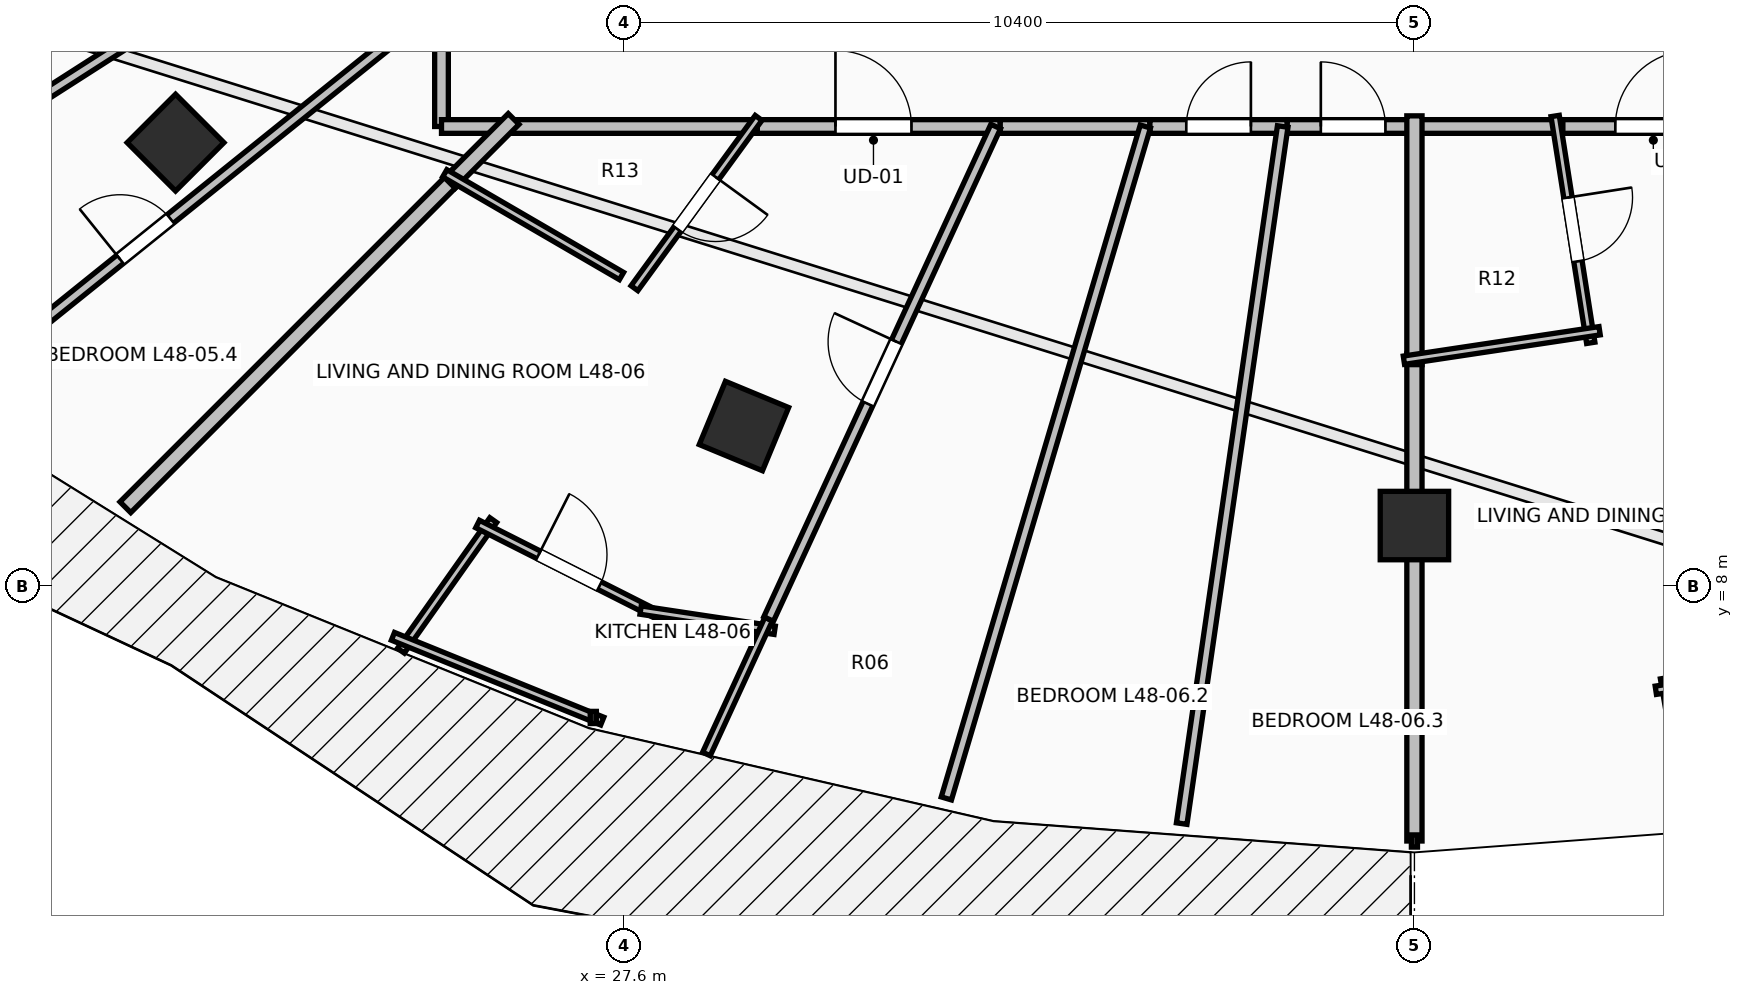
"""IFC4 building model, lengths in metres.
Left out: names, types, materials, properties, quantities, classifications, styles, units other than length and angle.
Written with IfcOpenShell. Run it as: python <this file> out.ifc"""

import sys

from ifc_helpers import new_model, si_unit, direction, frame, frame_2d, origin, origin_2d, place, context, subcontext, project, spatial, rectangle, extrude, element, fill, save


model = new_model("IFC4")
c1 = context("Model", 3, precision=1e-05, world=origin(), true_north=direction((0.0, 1.0)))
c2 = subcontext(c1, "Body", "Model", "MODEL_VIEW")
j1 = project(units=[si_unit("LENGTHUNIT", "METRE"), si_unit("PLANEANGLEUNIT", "RADIAN")], contexts=[c1])
p1 = place(None, origin())
s1 = spatial("IfcSite", under=j1, at=p1, CompositionType="ELEMENT")
p2 = place(p1, origin())
s2 = spatial("IfcBuilding", under=s1, at=p2, CompositionType="ELEMENT")
p3 = place(p2, frame((0.0, 0.0, 179.1)))
s3 = spatial("IfcBuildingStorey", under=s2, at=p3, CompositionType="ELEMENT", Elevation=179.1)
for number, where, z_axis, x_axis in (
    (1, (21.701, 13.838, 0.0), (0.0, 0.0, 1.0), (-0.707, -0.707, 0.0)),
    (2, (29.179, 10.109, 0.0), (0.0, 0.0, 1.0), (-0.383, -0.924, 0.0)),
    (3, (38.0, 8.8, 0.0), (0.0, 0.0, 1.0), (0.0, -1.0, 0.0)),
):
    element("IfcColumn", number, at=place(p3, frame(where, z_axis=z_axis, x_axis=x_axis)), inside=s3, PredefinedType="COLUMN", context=c2, shape_type="SweptSolid", body=[
        extrude(rectangle(XDim=0.9, YDim=0.9, at=origin_2d()), origin(), (0.0, 0.0, 1.0), 3.5),
    ])
p4 = place(p3, frame((25.2, 15.627, 0.0), z_axis=(0.0, 0.0, 1.0), x_axis=(0.0, -1.0, 0.0)))
e4 = element("IfcWall", 4, at=p4, inside=s3, PredefinedType="PARTITIONING", context=c2, shape_type="SweptSolid", body=[
    extrude(rectangle(XDim=1.577, YDim=0.18, at=frame_2d((0.789, 0.0))), origin(), (0.0, 0.0, 1.0), 2.432),
])
p5 = place(p3, frame((25.2, 14.05, 0.0), z_axis=(0.0, 0.0, 1.0), x_axis=(1.0, 0.0, 0.0)))
e5 = element("IfcWall", 5, at=p5, inside=s3, PredefinedType="PARTITIONING", context=c2, shape_type="SweptSolid", body=[
    extrude(rectangle(XDim=0.91, YDim=0.18, at=frame_2d((0.455, 0.0))), origin(), (0.0, 0.0, 1.0), 2.874),
])
p6 = place(p3, frame((29.215, 14.05, 0.0), z_axis=(0.0, 0.0, 1.0), x_axis=(1.0, 0.0, 0.0)))
e6 = element("IfcWall", 6, at=p6, inside=s3, PredefinedType="PARTITIONING", context=c2, shape_type="SweptSolid", body=[
    extrude(rectangle(XDim=3.336, YDim=0.18, at=frame_2d((1.668, 0.0))), origin(), (0.0, 0.0, 1.0), 3.24),
])
p7 = place(p6, frame((1.168, 0.0, 0.0)))
e7 = element("IfcOpeningElement", 7, at=p7, cuts=e6, PredefinedType="OPENING", context=c2, shape_type="SweptSolid", body=[
    extrude(rectangle(XDim=1.0, YDim=2.15, at=frame_2d((0.5, 1.075))), frame((0.0, 0.105, 0.0), z_axis=(0.0, -1.0, 0.0), x_axis=(1.0, 0.0, 0.0)), (0.0, 0.0, 1.0), 0.21),
])
p8 = place(p3, frame((25.97, 14.05, 0.0), z_axis=(0.0, 0.0, 1.0), x_axis=(1.0, 0.0, 0.0)))
e8 = element("IfcWall", 8, at=p8, inside=s3, PredefinedType="PARTITIONING", context=c2, shape_type="SweptSolid", body=[
    extrude(rectangle(XDim=3.385, YDim=0.18, at=frame_2d((1.692, 0.0))), origin(), (0.0, 0.0, 1.0), 2.432),
])
p9 = place(p3, frame((32.551, 14.05, 0.0), z_axis=(0.0, 0.0, 1.0), x_axis=(1.0, 0.0, 0.0)))
e9 = element("IfcWall", 9, at=p9, inside=s3, PredefinedType="PARTITIONING", context=c2, shape_type="SweptSolid", body=[
    extrude(rectangle(XDim=1.969, YDim=0.18, at=frame_2d((0.984, 0.0))), origin(), (0.0, 0.0, 1.0), 3.24),
])
p10 = place(p3, frame((34.52, 14.05, 0.0), z_axis=(0.0, 0.0, 1.0), x_axis=(1.0, 0.0, 0.0)))
e10 = element("IfcWall", 10, at=p10, inside=s3, PredefinedType="PARTITIONING", context=c2, shape_type="SweptSolid", body=[
    extrude(rectangle(XDim=1.807, YDim=0.18, at=frame_2d((0.903, 0.0))), origin(), (0.0, 0.0, 1.0), 3.24),
])
p11 = place(p10, frame((0.479, 0.0, 0.0)))
e11 = element("IfcOpeningElement", 11, at=p11, cuts=e10, PredefinedType="OPENING", context=c2, shape_type="SweptSolid", body=[
    extrude(rectangle(XDim=0.85, YDim=2.1, at=frame_2d((0.425, 1.05))), frame((0.0, 0.105, 0.0), z_axis=(0.0, -1.0, 0.0), x_axis=(1.0, 0.0, 0.0)), (0.0, 0.0, 1.0), 0.21),
])
p12 = place(p3, frame((36.327, 14.05, 0.0), z_axis=(0.0, 0.0, 1.0), x_axis=(1.0, 0.0, 0.0)))
e12 = element("IfcWall", 12, at=p12, inside=s3, PredefinedType="PARTITIONING", context=c2, shape_type="SweptSolid", body=[
    extrude(rectangle(XDim=1.733, YDim=0.18, at=frame_2d((0.867, 0.0))), origin(), (0.0, 0.0, 1.0), 2.922),
])
p13 = place(p12, frame((0.441, 0.0, 0.0)))
e13 = element("IfcOpeningElement", 13, at=p13, cuts=e12, PredefinedType="OPENING", context=c2, shape_type="SweptSolid", body=[
    extrude(rectangle(XDim=0.85, YDim=2.1, at=frame_2d((0.425, 1.05))), frame((0.0, 0.105, 0.0), z_axis=(0.0, -1.0, 0.0), x_axis=(1.0, 0.0, 0.0)), (0.0, 0.0, 1.0), 0.21),
])
p14 = place(p3, frame((39.813, 14.05, 0.0), z_axis=(0.0, 0.0, 1.0), x_axis=(1.0, 0.0, 0.0)))
e14 = element("IfcWall", 14, at=p14, inside=s3, PredefinedType="PARTITIONING", context=c2, shape_type="SweptSolid", body=[
    extrude(rectangle(XDim=2.66, YDim=0.18, at=frame_2d((1.33, 0.0))), origin(), (0.0, 0.0, 1.0), 2.922),
])
p15 = place(p14, frame((0.83, 0.0, 0.0)))
e15 = element("IfcOpeningElement", 15, at=p15, cuts=e14, PredefinedType="OPENING", context=c2, shape_type="SweptSolid", body=[
    extrude(rectangle(XDim=1.0, YDim=2.15, at=frame_2d((0.5, 1.075))), frame((0.0, 0.105, 0.0), z_axis=(0.0, -1.0, 0.0), x_axis=(1.0, 0.0, 0.0)), (0.0, 0.0, 1.0), 0.21),
])
p16 = place(p3, frame((37.92, 14.05, 0.0), z_axis=(0.0, 0.0, 1.0), x_axis=(1.0, 0.0, 0.0)))
e16 = element("IfcWall", 16, at=p16, inside=s3, PredefinedType="PARTITIONING", context=c2, shape_type="SweptSolid", body=[
    extrude(rectangle(XDim=2.033, YDim=0.18, at=frame_2d((1.017, 0.0))), origin(), (0.0, 0.0, 1.0), 2.922),
])
p17 = place(p3, frame((14.428, 14.28, 0.0), z_axis=(0.0, 0.0, 1.0), x_axis=(0.895423439435, 0.44521552546, 0.0)))
e17 = element("IfcWall", 17, at=p17, inside=s3, PredefinedType="PARTITIONING", context=c2, shape_type="SweptSolid", body=[
    extrude(rectangle(XDim=12.03, YDim=0.14, at=frame_2d((6.015, 0.0))), origin(), (0.0, 0.0, 1.0), 2.432),
])
p18 = place(p3, frame((16.555, 12.272, 0.0), z_axis=(0.0, 0.0, 1.0), x_axis=(0.842221721565, 0.539131312135, 0.0)))
e18 = element("IfcWall", 18, at=p18, inside=s3, PredefinedType="PARTITIONING", context=c2, shape_type="SweptSolid", body=[
    extrude(rectangle(XDim=10.265, YDim=0.14, at=frame_2d((5.132, 0.0))), origin(), (0.0, 0.0, 1.0), 2.432),
])
p19 = place(p3, frame((18.715, 10.487, 0.0), z_axis=(0.0, 0.0, 1.0), x_axis=(0.779157389419, 0.626828335762, 0.0)))
e19 = element("IfcWall", 19, at=p19, inside=s3, PredefinedType="PARTITIONING", context=c2, shape_type="SweptSolid", body=[
    extrude(rectangle(XDim=8.323, YDim=0.14, at=frame_2d((4.162, 0.0))), origin(), (0.0, 0.0, 1.0), 2.432),
])
p20 = place(p19, frame((2.896, 0.0, 0.0)))
e20 = element("IfcOpeningElement", 20, at=p20, cuts=e19, PredefinedType="OPENING", context=c2, shape_type="SweptSolid", body=[
    extrude(rectangle(XDim=0.85, YDim=2.1, at=frame_2d((0.425, 1.05))), frame((0.0, 0.085, 0.0), z_axis=(0.0, -1.0, 0.0), x_axis=(1.0, 0.0, 0.0)), (0.0, 0.0, 1.0), 0.17),
])
p21 = place(p3, frame((21.041, 9.041, 0.0), z_axis=(0.0, 0.0, 1.0), x_axis=(0.707106781187, 0.707106781187, 0.0)))
e21 = element("IfcWall", 21, at=p21, inside=s3, PredefinedType="PARTITIONING", context=c2, shape_type="SweptSolid", body=[
    extrude(rectangle(XDim=6.176, YDim=0.2, at=frame_2d((3.088, 0.0))), origin(), (0.0, 0.0, 1.0), 2.774),
])
p22 = place(p3, frame((25.309, 13.309, 0.0), z_axis=(0.0, 0.0, 1.0), x_axis=(0.707106781187, 0.707106781187, 0.0)))
e22 = element("IfcWall", 22, at=p22, inside=s3, PredefinedType="PARTITIONING", context=c2, shape_type="SweptSolid", body=[
    extrude(rectangle(XDim=1.188, YDim=0.2, at=frame_2d((0.594, 0.0))), origin(), (0.0, 0.0, 1.0), 2.874),
])
p23 = place(p3, frame((29.372, 14.163, 0.0), z_axis=(0.0, 0.0, 1.0), x_axis=(-0.589066743954, -0.808084383693, 0.0)))
e23 = element("IfcWall", 23, at=p23, inside=s3, PredefinedType="PARTITIONING", context=c2, shape_type="SweptSolid", body=[
    extrude(rectangle(XDim=2.772, YDim=0.11, at=frame_2d((1.386, 0.0))), origin(), (0.0, 0.0, 1.0), 2.432),
])
p24 = place(p23, frame((0.961, 0.0, 0.0)))
e24 = element("IfcOpeningElement", 24, at=p24, cuts=e23, PredefinedType="OPENING", context=c2, shape_type="SweptSolid", body=[
    extrude(rectangle(XDim=0.85, YDim=2.1, at=frame_2d((0.425, 1.05))), frame((0.0, 0.07, 0.0), z_axis=(0.0, -1.0, 0.0), x_axis=(1.0, 0.0, 0.0)), (0.0, 0.0, 1.0), 0.14),
])
p25 = place(p3, frame((27.568, 12.083, 0.0), z_axis=(0.0, 0.0, 1.0), x_axis=(-0.864515441931, 0.502606258082, 0.0)))
e25 = element("IfcWall", 25, at=p25, inside=s3, PredefinedType="PARTITIONING", context=c2, shape_type="SweptSolid", body=[
    extrude(rectangle(XDim=2.69, YDim=0.11, at=frame_2d((1.345, 0.0))), origin(), (0.0, 0.0, 1.0), 3.24),
])
p26 = place(p3, frame((24.666, 7.154, 0.0), z_axis=(0.0, 0.0, 1.0), x_axis=(0.577389248155, 0.816469017241, 0.0)))
e26 = element("IfcWall", 26, at=p26, inside=s3, PredefinedType="PARTITIONING", context=c2, shape_type="SweptSolid", body=[
    extrude(rectangle(XDim=2.104, YDim=0.11, at=frame_2d((1.052, 0.0))), origin(), (0.0, 0.0, 1.0), 3.24),
])
p27 = place(p3, frame((25.675, 8.82, 0.0), z_axis=(0.0, 0.0, 1.0), x_axis=(0.892628057427, -0.450793911999, 0.0)))
e27 = element("IfcWall", 27, at=p27, inside=s3, PredefinedType="PARTITIONING", context=c2, shape_type="SweptSolid", body=[
    extrude(rectangle(XDim=2.698, YDim=0.11, at=frame_2d((1.349, 0.0))), origin(), (0.0, 0.0, 1.0), 3.24),
])
p28 = place(p27, frame((0.899, 0.0, 0.0)))
e28 = element("IfcOpeningElement", 28, at=p28, cuts=e27, PredefinedType="OPENING", context=c2, shape_type="SweptSolid", body=[
    extrude(rectangle(XDim=0.9, YDim=2.1, at=frame_2d((0.45, 1.05))), frame((0.0, 0.07, 0.0), z_axis=(0.0, -1.0, 0.0), x_axis=(1.0, 0.0, 0.0)), (0.0, 0.0, 1.0), 0.14),
])
p29 = place(p3, frame((27.82, 7.688, 0.0), z_axis=(0.0, 0.0, 1.0), x_axis=(0.988830695744, -0.149043131857, 0.0)))
e29 = element("IfcWall", 29, at=p29, inside=s3, PredefinedType="PARTITIONING", context=c2, shape_type="SweptSolid", body=[
    extrude(rectangle(XDim=1.784, YDim=0.11, at=frame_2d((0.892, 0.0))), origin(), (0.0, 0.0, 1.0), 3.24),
])
p30 = place(p3, frame((29.504, 7.57, 0.0), z_axis=(0.0, 0.0, 1.0), x_axis=(-0.418662115749, -0.908142077451, 0.0)))
e30 = element("IfcWall", 30, at=p30, inside=s3, PredefinedType="PARTITIONING", context=c2, shape_type="SweptSolid", body=[
    extrude(rectangle(XDim=1.955, YDim=0.11, at=frame_2d((0.977, 0.0))), origin(), (0.0, 0.0, 1.0), 3.24),
])
p31 = place(p3, frame((24.561, 7.343, 0.0), z_axis=(0.0, 0.0, 1.0), x_axis=(0.926858319785, -0.375411314487, 0.0)))
e31 = element("IfcWall", 31, at=p31, inside=s3, PredefinedType="PARTITIONING", context=c2, shape_type="SweptSolid", body=[
    extrude(rectangle(XDim=2.971, YDim=0.11, at=frame_2d((1.485, 0.0))), origin(), (0.0, 0.0, 1.0), 3.24),
])
p32 = place(p3, frame((29.504, 7.57, 0.0), z_axis=(0.0, 0.0, 1.0), x_axis=(0.418658902348, 0.908143558852, 0.0)))
e32 = element("IfcWall", 32, at=p32, inside=s3, PredefinedType="PARTITIONING", context=c2, shape_type="SweptSolid", body=[
    extrude(rectangle(XDim=7.135, YDim=0.14, at=frame_2d((3.568, 0.0))), origin(), (0.0, 0.0, 1.0), 2.774),
])
p33 = place(p32, frame((3.118, 0.0, 0.0)))
e33 = element("IfcOpeningElement", 33, at=p33, cuts=e32, PredefinedType="OPENING", context=c2, shape_type="SweptSolid", body=[
    extrude(rectangle(XDim=0.9, YDim=2.1, at=frame_2d((0.45, 1.05))), frame((0.0, 0.085, 0.0), z_axis=(0.0, -1.0, 0.0), x_axis=(1.0, 0.0, 0.0)), (0.0, 0.0, 1.0), 0.17),
])
p34 = place(p3, frame((31.842, 5.21, 0.0), z_axis=(0.0, 0.0, 1.0), x_axis=(0.283952183478, 0.958838441813, 0.0)))
e34 = element("IfcWall", 34, at=p34, inside=s3, PredefinedType="PARTITIONING", context=c2, shape_type="SweptSolid", body=[
    extrude(rectangle(XDim=9.219, YDim=0.14, at=frame_2d((4.61, 0.0))), origin(), (0.0, 0.0, 1.0), 2.774),
])
p35 = place(p3, frame((34.938, 4.879, 0.0), z_axis=(0.0, 0.0, 1.0), x_axis=(0.143423836858, 0.989661357749, 0.0)))
e35 = element("IfcWall", 35, at=p35, inside=s3, PredefinedType="PARTITIONING", context=c2, shape_type="SweptSolid", body=[
    extrude(rectangle(XDim=9.267, YDim=0.14, at=frame_2d((4.633, 0.0))), origin(), (0.0, 0.0, 1.0), 2.774),
])
p36 = place(p3, frame((38.0, 4.65, 0.0), z_axis=(0.0, 0.0, 1.0), x_axis=(0.0, 1.0, 0.0)))
e36 = element("IfcWall", 36, at=p36, inside=s3, PredefinedType="PARTITIONING", context=c2, shape_type="SweptSolid", body=[
    extrude(rectangle(XDim=6.407, YDim=0.2, at=frame_2d((3.204, 0.0))), origin(), (0.0, 0.0, 1.0), 3.24),
])
p37 = place(p3, frame((38.0, 10.917, 0.0), z_axis=(0.0, 0.0, 1.0), x_axis=(0.0, 1.0, 0.0)))
e37 = element("IfcWall", 37, at=p37, inside=s3, PredefinedType="PARTITIONING", context=c2, shape_type="SweptSolid", body=[
    extrude(rectangle(XDim=3.273, YDim=0.2, at=frame_2d((1.636, 0.0))), origin(), (0.0, 0.0, 1.0), 2.874),
])
p38 = place(p3, frame((39.851, 14.188, 0.0), z_axis=(0.0, 0.0, 1.0), x_axis=(0.154995605388, -0.98791515947, 0.0)))
e38 = element("IfcWall", 38, at=p38, inside=s3, PredefinedType="PARTITIONING", context=c2, shape_type="SweptSolid", body=[
    extrude(rectangle(XDim=3.021, YDim=0.11, at=frame_2d((1.511, 0.0))), origin(), (0.0, 0.0, 1.0), 2.874),
])
p39 = place(p38, frame((1.086, 0.0, 0.0)))
e39 = element("IfcOpeningElement", 39, at=p39, cuts=e38, PredefinedType="OPENING", context=c2, shape_type="SweptSolid", body=[
    extrude(rectangle(XDim=0.85, YDim=2.1, at=frame_2d((0.425, 1.05))), frame((0.0, 0.07, 0.0), z_axis=(0.0, -1.0, 0.0), x_axis=(1.0, 0.0, 0.0)), (0.0, 0.0, 1.0), 0.14),
])
p40 = place(p3, frame((40.436, 11.363, 0.0), z_axis=(0.0, 0.0, 1.0), x_axis=(-0.988852287037, -0.148899813371, 0.0)))
e40 = element("IfcWall", 40, at=p40, inside=s3, PredefinedType="PARTITIONING", context=c2, shape_type="SweptSolid", body=[
    extrude(rectangle(XDim=2.604, YDim=0.11, at=frame_2d((1.302, 0.0))), origin(), (0.0, 0.0, 1.0), 3.24),
])
p41 = place(p3, frame((41.635, 4.782, 0.0), z_axis=(0.0, 0.0, 1.0), x_axis=(-0.168804313657, 0.985649584635, 0.0)))
e41 = element("IfcWall", 41, at=p41, inside=s3, PredefinedType="PARTITIONING", context=c2, shape_type="SweptSolid", body=[
    extrude(rectangle(XDim=2.039, YDim=0.11, at=frame_2d((1.02, 0.0))), origin(), (0.0, 0.0, 1.0), 3.24),
])
p42 = place(p3, frame((41.176, 6.633, 0.0), z_axis=(0.0, 0.0, 1.0), x_axis=(0.988877230123, 0.148734070555, 0.0)))
e42 = element("IfcWall", 42, at=p42, inside=s3, PredefinedType="PARTITIONING", context=c2, shape_type="SweptSolid", body=[
    extrude(rectangle(XDim=3.943, YDim=0.11, at=frame_2d((1.971, 0.0))), origin(), (0.0, 0.0, 1.0), 3.24),
])
p43 = place(p42, frame((1.521, 0.0, 0.0)))
e43 = element("IfcOpeningElement", 43, at=p43, cuts=e42, PredefinedType="OPENING", context=c2, shape_type="SweptSolid", body=[
    extrude(rectangle(XDim=0.9, YDim=2.1, at=frame_2d((0.45, 1.05))), frame((0.0, 0.07, 0.0), z_axis=(0.0, -1.0, 0.0), x_axis=(1.0, 0.0, 0.0)), (0.0, 0.0, 1.0), 0.14),
])
p44 = place(p7, origin())
e44 = element("IfcDoor", 44, at=p44, inside=s3, OperationType="SINGLE_SWING_LEFT", PredefinedType="DOOR", context=c2, shape_type="SweptSolid", body=[
    extrude(rectangle(XDim=1.0, YDim=2.15, at=frame_2d((0.5, 1.075))), frame((0.0, 0.025, 0.0), z_axis=(0.0, -1.0, 0.0), x_axis=(1.0, 0.0, 0.0)), (0.0, 0.0, 1.0), 0.05),
])
fill(e7, e44)
p45 = place(p15, origin())
e45 = element("IfcDoor", 45, at=p45, inside=s3, OperationType="SINGLE_SWING_RIGHT", PredefinedType="DOOR", context=c2, shape_type="SweptSolid", body=[
    extrude(rectangle(XDim=1.0, YDim=2.15, at=frame_2d((0.5, 1.075))), frame((0.0, 0.025, 0.0), z_axis=(0.0, -1.0, 0.0), x_axis=(1.0, 0.0, 0.0)), (0.0, 0.0, 1.0), 0.05),
])
fill(e15, e45)
p46 = place(p24, origin())
e46 = element("IfcDoor", 46, at=p46, inside=s3, OperationType="SINGLE_SWING_LEFT", PredefinedType="DOOR", context=c2, shape_type="SweptSolid", body=[
    extrude(rectangle(XDim=0.85, YDim=2.1, at=frame_2d((0.425, 1.05))), frame((0.0, 0.025, 0.0), z_axis=(0.0, -1.0, 0.0), x_axis=(1.0, 0.0, 0.0)), (0.0, 0.0, 1.0), 0.05),
])
fill(e24, e46)
p47 = place(p28, origin())
e47 = element("IfcDoor", 47, at=p47, inside=s3, OperationType="SINGLE_SWING_LEFT", PredefinedType="DOOR", context=c2, shape_type="SweptSolid", body=[
    extrude(rectangle(XDim=0.9, YDim=2.1, at=frame_2d((0.45, 1.05))), frame((0.0, 0.025, 0.0), z_axis=(0.0, -1.0, 0.0), x_axis=(1.0, 0.0, 0.0)), (0.0, 0.0, 1.0), 0.05),
])
fill(e28, e47)
p48 = place(p33, origin())
e48 = element("IfcDoor", 48, at=p48, inside=s3, OperationType="SINGLE_SWING_RIGHT", PredefinedType="DOOR", context=c2, shape_type="SweptSolid", body=[
    extrude(rectangle(XDim=0.9, YDim=2.1, at=frame_2d((0.45, 1.05))), frame((0.0, 0.025, 0.0), z_axis=(0.0, -1.0, 0.0), x_axis=(1.0, 0.0, 0.0)), (0.0, 0.0, 1.0), 0.05),
])
fill(e33, e48)
p49 = place(p39, origin())
e49 = element("IfcDoor", 49, at=p49, inside=s3, OperationType="SINGLE_SWING_LEFT", PredefinedType="DOOR", context=c2, shape_type="SweptSolid", body=[
    extrude(rectangle(XDim=0.85, YDim=2.1, at=frame_2d((0.425, 1.05))), frame((0.0, 0.025, 0.0), z_axis=(0.0, -1.0, 0.0), x_axis=(1.0, 0.0, 0.0)), (0.0, 0.0, 1.0), 0.05),
])
fill(e39, e49)
p50 = place(p11, origin())
e50 = element("IfcDoor", 50, at=p50, inside=s3, OperationType="SINGLE_SWING_RIGHT", PredefinedType="DOOR", context=c2, shape_type="SweptSolid", body=[
    extrude(rectangle(XDim=0.85, YDim=2.1, at=frame_2d((0.425, 1.05))), frame((0.0, 0.025, 0.0), z_axis=(0.0, -1.0, 0.0), x_axis=(1.0, 0.0, 0.0)), (0.0, 0.0, 1.0), 0.05),
])
fill(e11, e50)
p51 = place(p13, origin())
e51 = element("IfcDoor", 51, at=p51, inside=s3, OperationType="SINGLE_SWING_LEFT", PredefinedType="DOOR", context=c2, shape_type="SweptSolid", body=[
    extrude(rectangle(XDim=0.85, YDim=2.1, at=frame_2d((0.425, 1.05))), frame((0.0, 0.025, 0.0), z_axis=(0.0, -1.0, 0.0), x_axis=(1.0, 0.0, 0.0)), (0.0, 0.0, 1.0), 0.05),
])
fill(e13, e51)
p52 = place(p20, origin())
e52 = element("IfcDoor", 52, at=p52, inside=s3, OperationType="SINGLE_SWING_LEFT", PredefinedType="DOOR", context=c2, shape_type="SweptSolid", body=[
    extrude(rectangle(XDim=0.85, YDim=2.1, at=frame_2d((0.425, 1.05))), frame((0.0, 0.025, 0.0), z_axis=(0.0, -1.0, 0.0), x_axis=(1.0, 0.0, 0.0)), (0.0, 0.0, 1.0), 0.05),
])
fill(e20, e52)
save(model, sys.argv[1])
